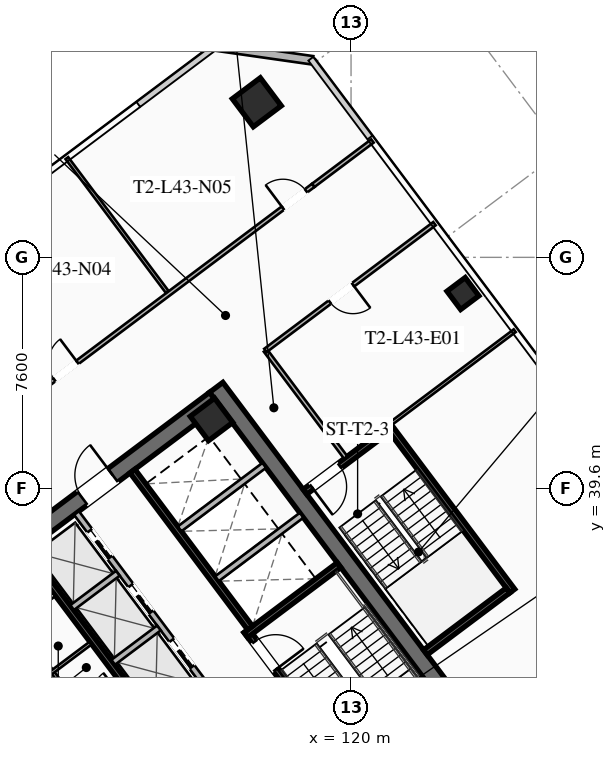
"""IFC4 building model, lengths in metres.
Left out: names, types, materials, properties, quantities, classifications, styles, units other than length and angle.
Written with IfcOpenShell. Run it as: python <this file> out.ifc"""

import sys

from ifc_helpers import new_model, si_unit, direction, frame, frame_2d, origin, origin_2d, place, context, subcontext, project, spatial, rectangle, hollow_rectangle, extrude, element, fill, save


model = new_model("IFC4")
c1 = context("Model", 3, precision=1e-05, world=origin(), true_north=direction((0.0, 1.0)))
c2 = subcontext(c1, "Body", "Model", "MODEL_VIEW")
j1 = project(units=[si_unit("LENGTHUNIT", "METRE"), si_unit("PLANEANGLEUNIT", "RADIAN")], contexts=[c1])
p1 = place(None, origin())
s1 = spatial("IfcSite", under=j1, at=p1, CompositionType="ELEMENT")
p2 = place(p1, origin())
s2 = spatial("IfcBuilding", under=s1, at=p2, CompositionType="ELEMENT")
p3 = place(p2, frame((0.0, 0.0, 160.55)))
s3 = spatial("IfcBuildingStorey", under=s2, at=p3, CompositionType="ELEMENT", Elevation=160.55)
for number, where, z_axis, x_axis in (
    (1, (112.436, 21.077, 0.0), (0.0, 0.0, 1.0), (-0.6, 0.8, 0.0)),
    (2, (115.564, 42.923, 0.0), (0.0, 0.0, 1.0), (0.6, -0.8, 0.0)),
):
    element("IfcWall", number, at=place(p3, frame(where, z_axis=z_axis, x_axis=x_axis)), inside=s3, PredefinedType="SHEAR", context=c2, shape_type="SweptSolid", body=[
        extrude(rectangle(XDim=15.6, YDim=0.55, at=frame_2d((7.8, 0.0))), origin(), (0.0, 0.0, 1.0), 3.55),
    ])
p4 = place(p3, frame((103.461, 33.502, 0.0), z_axis=(0.0, 0.0, 1.0), x_axis=(0.799998054672, 0.600002593761, 0.0)))
e3 = element("IfcWall", 3, at=p4, inside=s3, PredefinedType="SHEAR", context=c2, shape_type="SweptSolid", body=[
    extrude(rectangle(XDim=15.06, YDim=0.55, at=frame_2d((7.53, 0.0))), origin(), (0.0, 0.0, 1.0), 3.55),
])
p5 = place(p4, frame((4.58, 0.0, 0.0)))
e4 = element("IfcOpeningElement", 4, at=p5, cuts=e3, PredefinedType="OPENING", context=c2, shape_type="SweptSolid", body=[
    extrude(rectangle(XDim=1.25, YDim=2.25, at=frame_2d((0.625, 1.125))), frame((0.0, 0.285, 0.0), z_axis=(0.0, -1.0, 0.0), x_axis=(1.0, 0.0, 0.0)), (0.0, 0.0, 1.0), 0.57),
])
p6 = place(p4, frame((9.63, 0.0, 0.0)))
e5 = element("IfcOpeningElement", 5, at=p6, cuts=e3, PredefinedType="OPENING", context=c2, shape_type="SweptSolid", body=[
    extrude(rectangle(XDim=1.25, YDim=2.25, at=frame_2d((0.625, 1.125))), frame((0.0, 0.285, 0.0), z_axis=(0.0, -1.0, 0.0), x_axis=(1.0, 0.0, 0.0)), (0.0, 0.0, 1.0), 0.57),
])
p7 = place(p3, frame((115.41, 41.87, 0.0), z_axis=(0.0, 0.0, 1.0), x_axis=(0.799999996291, 0.600000004945, 0.0)))
e6 = element("IfcColumn", 6, at=p7, inside=s3, PredefinedType="COLUMN", context=c2, shape_type="SweptSolid", body=[
    extrude(hollow_rectangle(XDim=1.0, YDim=1.0, WallThickness=0.04, at=origin_2d()), origin(), (0.0, 0.0, 1.0), 3.37),
])
p8 = place(p3, frame((116.9, 52.3, 0.0), z_axis=(0.0, 0.0, 1.0), x_axis=(0.799999996291, 0.600000004945, 0.0)))
e7 = element("IfcColumn", 7, at=p8, inside=s3, PredefinedType="COLUMN", context=c2, shape_type="SweptSolid", body=[
    extrude(hollow_rectangle(XDim=1.15, YDim=1.15, WallThickness=0.045, at=origin_2d()), origin(), (0.0, 0.0, 1.0), 3.37),
])
p9 = place(p3, frame((123.68, 46.01, 0.0), z_axis=(0.0, 0.0, 1.0), x_axis=(0.799999996291, 0.600000004945, 0.0)))
e8 = element("IfcColumn", 8, at=p9, inside=s3, PredefinedType="COLUMN", context=c2, shape_type="SweptSolid", body=[
    extrude(hollow_rectangle(XDim=0.75, YDim=0.75, WallThickness=0.032, at=origin_2d()), origin(), (0.0, 0.0, 1.0), 3.37),
])
p10 = place(p3, frame((115.52, 54.14, 0.0), z_axis=(0.0, 0.0, 1.0), x_axis=(0.989950994782, -0.141410847992, 0.0)))
e9 = element("IfcWall", 9, at=p10, inside=s3, PredefinedType="SOLIDWALL", context=c2, shape_type="SweptSolid", body=[
    extrude(rectangle(XDim=3.253, YDim=0.28, at=frame_2d((1.626, 0.0))), origin(), (0.0, 0.0, 1.0), 3.37),
])
p11 = place(p3, frame((111.44, 29.08, 0.0), z_axis=(0.0, 0.0, 1.0), x_axis=(-0.59999029481, 0.8000072788, 0.0)))
e10 = element("IfcWall", 10, at=p11, inside=s3, PredefinedType="SHEAR", context=c2, shape_type="SweptSolid", body=[
    extrude(rectangle(XDim=8.05, YDim=0.2, at=frame_2d((4.025, 0.0))), origin(), (0.0, 0.0, 1.0), 3.37),
])
p12 = place(p11, frame((0.45, 0.0, 0.0)))
e11 = element("IfcOpeningElement", 11, at=p12, cuts=e10, PredefinedType="OPENING", context=c2, shape_type="SweptSolid", body=[
    extrude(rectangle(XDim=1.15, YDim=2.2, at=frame_2d((0.575, 1.1))), frame((0.0, 0.11, 0.0), z_axis=(0.0, -1.0, 0.0), x_axis=(1.0, 0.0, 0.0)), (0.0, 0.0, 1.0), 0.22),
])
p13 = place(p3, frame((116.56, 34.92, 0.0), z_axis=(0.0, 0.0, 1.0), x_axis=(0.59999029481, -0.8000072788, 0.0)))
e12 = element("IfcWall", 12, at=p13, inside=s3, PredefinedType="SHEAR", context=c2, shape_type="SweptSolid", body=[
    extrude(rectangle(XDim=8.05, YDim=0.2, at=frame_2d((4.025, 0.0))), origin(), (0.0, 0.0, 1.0), 3.37),
])
p14 = place(p13, frame((0.45, 0.0, 0.0)))
e13 = element("IfcOpeningElement", 13, at=p14, cuts=e12, PredefinedType="OPENING", context=c2, shape_type="SweptSolid", body=[
    extrude(rectangle(XDim=1.15, YDim=2.2, at=frame_2d((0.575, 1.1))), frame((0.0, 0.11, 0.0), z_axis=(0.0, -1.0, 0.0), x_axis=(1.0, 0.0, 0.0)), (0.0, 0.0, 1.0), 0.22),
])
p15 = place(p3, frame((116.54, 34.78, 0.0), z_axis=(0.0, 0.0, 1.0), x_axis=(0.800015298837, 0.599979601008, 0.0)))
e14 = element("IfcWall", 14, at=p15, inside=s3, PredefinedType="SHEAR", context=c2, shape_type="SweptSolid", body=[
    extrude(rectangle(XDim=3.83, YDim=0.2, at=frame_2d((1.915, 0.0))), origin(), (0.0, 0.0, 1.0), 3.37),
])
p16 = place(p3, frame((117.998, 25.936, 0.0), z_axis=(0.0, 0.0, 1.0), x_axis=(-0.600002693989, 0.799997979501, 0.0)))
e15 = element("IfcWall", 15, at=p16, inside=s3, PredefinedType="SHEAR", context=c2, shape_type="SweptSolid", body=[
    extrude(rectangle(XDim=14.5, YDim=0.2, at=frame_2d((7.25, 0.0))), origin(), (0.0, 0.0, 1.0), 3.37),
])
p17 = place(p3, frame((112.81, 40.17, 0.0), z_axis=(0.0, 0.0, 1.0), x_axis=(0.599993943644, -0.800004542231, 0.0)))
e16 = element("IfcWall", 16, at=p17, inside=s3, PredefinedType="SHEAR", context=c2, shape_type="SweptSolid", body=[
    extrude(rectangle(XDim=6.45, YDim=0.2, at=frame_2d((3.225, 0.0))), origin(), (0.0, 0.0, 1.0), 3.37),
])
for number, where, z_axis, x_axis in (
    (17, (115.59, 36.63, 0.0), (0.0, 0.0, 1.0), (0.8, 0.6, 0.0)),
    (18, (114.36, 38.27, 0.0), (0.0, 0.0, 1.0), (0.8, 0.6, 0.0)),
):
    element("IfcWall", number, at=place(p3, frame(where, z_axis=z_axis, x_axis=x_axis)), inside=s3, PredefinedType="SOLIDWALL", context=c2, shape_type="SweptSolid", body=[
        extrude(rectangle(XDim=3.48, YDim=0.2, at=frame_2d((1.74, 0.0))), origin(), (0.0, 0.0, 1.0), 3.37),
    ])
p18 = place(p3, frame((107.71, 34.22, 0.0), z_axis=(0.0, 0.0, 1.0), x_axis=(0.799981399002, 0.60002480053, 0.0)))
e19 = element("IfcWall", 19, at=p18, inside=s3, PredefinedType="PARTITIONING", context=c2, shape_type="SweptSolid", body=[
    extrude(rectangle(XDim=3.15, YDim=0.135, at=frame_2d((1.575, 0.0))), origin(), (0.0, 0.0, 1.0), 2.723),
])
p19 = place(p18, frame((0.25, 0.0, 0.0)))
e20 = element("IfcOpeningElement", 20, at=p19, cuts=e19, PredefinedType="OPENING", context=c2, shape_type="SweptSolid", body=[
    extrude(rectangle(XDim=0.95, YDim=2.05, at=frame_2d((0.475, 1.025))), frame((0.0, 0.077, 0.0), z_axis=(0.0, -1.0, 0.0), x_axis=(1.0, 0.0, 0.0)), (0.0, 0.0, 1.0), 0.155),
])
p20 = place(p18, frame((1.95, 0.0, 0.0)))
e21 = element("IfcOpeningElement", 21, at=p20, cuts=e19, PredefinedType="OPENING", context=c2, shape_type="SweptSolid", body=[
    extrude(rectangle(XDim=0.95, YDim=2.05, at=frame_2d((0.475, 1.025))), frame((0.0, 0.077, 0.0), z_axis=(0.0, -1.0, 0.0), x_axis=(1.0, 0.0, 0.0)), (0.0, 0.0, 1.0), 0.155),
])
p21 = place(p3, frame((111.296, 32.072, 0.0), z_axis=(0.0, 0.0, 1.0), x_axis=(-0.59995887973, 0.800030838552, 0.0)))
e22 = element("IfcWall", 22, at=p21, inside=s3, PredefinedType="PARTITIONING", context=c2, shape_type="SweptSolid", body=[
    extrude(rectangle(XDim=3.8, YDim=0.11, at=frame_2d((1.9, 0.0))), origin(), (0.0, 0.0, 1.0), 2.723),
])
p22 = place(p3, frame((108.91, 32.62, 0.0), z_axis=(0.0, 0.0, 1.0), x_axis=(0.800018601094, 0.59997519774, 0.0)))
e23 = element("IfcWall", 23, at=p22, inside=s3, PredefinedType="PARTITIONING", context=c2, shape_type="SweptSolid", body=[
    extrude(rectangle(XDim=3.15, YDim=0.11, at=frame_2d((1.575, 0.0))), origin(), (0.0, 0.0, 1.0), 2.723),
])
p23 = place(p3, frame((115.11, 33.27, 0.0), z_axis=(0.0, 0.0, 1.0), x_axis=(-0.600011322243, 0.799991508192, 0.0)))
e24 = element("IfcWall", 24, at=p23, inside=s3, PredefinedType="SOLIDWALL", context=c2, shape_type="SweptSolid", body=[
    extrude(rectangle(XDim=6.9, YDim=0.2, at=frame_2d((3.45, 0.0))), origin(), (0.0, 0.0, 1.0), 3.37),
])
p24 = place(p23, frame((0.575, 0.0, 0.0)))
e25 = element("IfcOpeningElement", 25, at=p24, cuts=e24, PredefinedType="OPENING", context=c2, shape_type="SweptSolid", body=[
    extrude(rectangle(XDim=1.1, YDim=2.2, at=frame_2d((0.55, 1.1))), frame((0.0, 0.11, 0.0), z_axis=(0.0, -1.0, 0.0), x_axis=(1.0, 0.0, 0.0)), (0.0, 0.0, 1.0), 0.22),
])
p25 = place(p23, frame((2.825, 0.0, 0.0)))
e26 = element("IfcOpeningElement", 26, at=p25, cuts=e24, PredefinedType="OPENING", context=c2, shape_type="SweptSolid", body=[
    extrude(rectangle(XDim=1.1, YDim=2.2, at=frame_2d((0.55, 1.1))), frame((0.0, 0.11, 0.0), z_axis=(0.0, -1.0, 0.0), x_axis=(1.0, 0.0, 0.0)), (0.0, 0.0, 1.0), 0.22),
])
p26 = place(p23, frame((5.075, 0.0, 0.0)))
e27 = element("IfcOpeningElement", 27, at=p26, cuts=e24, PredefinedType="OPENING", context=c2, shape_type="SweptSolid", body=[
    extrude(rectangle(XDim=1.1, YDim=2.2, at=frame_2d((0.55, 1.1))), frame((0.0, 0.11, 0.0), z_axis=(0.0, -1.0, 0.0), x_axis=(1.0, 0.0, 0.0)), (0.0, 0.0, 1.0), 0.22),
])
p27 = place(p3, frame((112.176, 33.882, 0.0), z_axis=(0.0, 0.0, 1.0), x_axis=(0.8, 0.6, 0.0)))
e28 = element("IfcWall", 28, at=p27, inside=s3, PredefinedType="SOLIDWALL", context=c2, shape_type="SweptSolid", body=[
    extrude(rectangle(XDim=1.88, YDim=0.2, at=frame_2d((0.94, 0.0))), origin(), (0.0, 0.0, 1.0), 3.37),
])
p28 = place(p3, frame((110.826, 35.682, 0.0), z_axis=(0.0, 0.0, 1.0), x_axis=(0.799984418148, 0.600020775241, 0.0)))
e29 = element("IfcWall", 29, at=p28, inside=s3, PredefinedType="SOLIDWALL", context=c2, shape_type="SweptSolid", body=[
    extrude(rectangle(XDim=1.88, YDim=0.2, at=frame_2d((0.94, 0.0))), origin(), (0.0, 0.0, 1.0), 3.37),
])
p29 = place(p3, frame((125.304, 36.228, 0.0), z_axis=(0.0, 0.0, 1.0), x_axis=(-0.59998851072, 0.800008616831, 0.0)))
e30 = element("IfcWall", 30, at=p29, inside=s3, PredefinedType="SHEAR", context=c2, shape_type="SweptSolid", body=[
    extrude(rectangle(XDim=6.8, YDim=0.2, at=frame_2d((3.4, 0.0))), origin(), (0.0, 0.0, 1.0), 3.37),
])
p30 = place(p3, frame((121.204, 41.528, 0.0), z_axis=(0.0, 0.0, 1.0), x_axis=(-0.800017232136, -0.599977023131, 0.0)))
e31 = element("IfcWall", 31, at=p30, inside=s3, PredefinedType="SHEAR", context=c2, shape_type="SweptSolid", body=[
    extrude(rectangle(XDim=3.4, YDim=0.2, at=frame_2d((1.7, 0.0))), origin(), (0.0, 0.0, 1.0), 3.37),
])
p31 = place(p30, frame((1.975, 0.0, 0.0)))
e32 = element("IfcOpeningElement", 32, at=p31, cuts=e31, PredefinedType="OPENING", context=c2, shape_type="SweptSolid", body=[
    extrude(rectangle(XDim=1.15, YDim=2.2, at=frame_2d((0.575, 1.1))), frame((0.0, 0.11, 0.0), z_axis=(0.0, -1.0, 0.0), x_axis=(1.0, 0.0, 0.0)), (0.0, 0.0, 1.0), 0.22),
])
p32 = place(p3, frame((122.444, 34.208, 0.0), z_axis=(0.0, 0.0, 1.0), x_axis=(0.79999138319, 0.600011488909, 0.0)))
e33 = element("IfcWall", 33, at=p32, inside=s3, PredefinedType="SHEAR", context=c2, shape_type="SweptSolid", body=[
    extrude(rectangle(XDim=3.4, YDim=0.2, at=frame_2d((1.7, 0.0))), origin(), (0.0, 0.0, 1.0), 3.37),
])
p33 = place(p3, frame((119.824, 40.618, 0.0), z_axis=(0.0, 0.0, 1.0), x_axis=(-0.599982243973, 0.800013316712, 0.0)))
e34 = element("IfcWall", 34, at=p33, inside=s3, PredefinedType="PARTITIONING", context=c2, shape_type="SweptSolid", body=[
    extrude(rectangle(XDim=4.4, YDim=0.135, at=frame_2d((2.2, 0.0))), origin(), (0.0, 0.0, 1.0), 2.723),
])
p34 = place(p3, frame((95.8, 32.35, 0.0), z_axis=(0.0, 0.0, 1.0), x_axis=(0.8, 0.6, 0.0)))
e35 = element("IfcWall", 35, at=p34, inside=s3, PredefinedType="PARTITIONING", context=c2, shape_type="SweptSolid", body=[
    extrude(rectangle(XDim=28.7, YDim=0.135, at=frame_2d((14.35, 0.0))), origin(), (0.0, 0.0, 1.0), 2.723),
])
p35 = place(p34, frame((0.3, 0.0, 0.0)))
e36 = element("IfcOpeningElement", 36, at=p35, cuts=e35, PredefinedType="OPENING", context=c2, shape_type="SweptSolid", body=[
    extrude(rectangle(XDim=0.95, YDim=2.05, at=frame_2d((0.475, 1.025))), frame((0.0, 0.077, 0.0), z_axis=(0.0, -1.0, 0.0), x_axis=(1.0, 0.0, 0.0)), (0.0, 0.0, 1.0), 0.155),
])
p36 = place(p34, frame((9.959, 0.0, 0.0)))
e37 = element("IfcOpeningElement", 37, at=p36, cuts=e35, PredefinedType="OPENING", context=c2, shape_type="SweptSolid", body=[
    extrude(rectangle(XDim=0.95, YDim=2.05, at=frame_2d((0.475, 1.025))), frame((0.0, 0.077, 0.0), z_axis=(0.0, -1.0, 0.0), x_axis=(1.0, 0.0, 0.0)), (0.0, 0.0, 1.0), 0.155),
])
p37 = place(p34, frame((14.005, 0.0, 0.0)))
e38 = element("IfcOpeningElement", 38, at=p37, cuts=e35, PredefinedType="OPENING", context=c2, shape_type="SweptSolid", body=[
    extrude(rectangle(XDim=0.95, YDim=2.05, at=frame_2d((0.475, 1.025))), frame((0.0, 0.077, 0.0), z_axis=(0.0, -1.0, 0.0), x_axis=(1.0, 0.0, 0.0)), (0.0, 0.0, 1.0), 0.155),
])
p38 = place(p34, frame((18.049, 0.0, 0.0)))
e39 = element("IfcOpeningElement", 39, at=p38, cuts=e35, PredefinedType="OPENING", context=c2, shape_type="SweptSolid", body=[
    extrude(rectangle(XDim=0.95, YDim=2.05, at=frame_2d((0.475, 1.025))), frame((0.0, 0.077, 0.0), z_axis=(0.0, -1.0, 0.0), x_axis=(1.0, 0.0, 0.0)), (0.0, 0.0, 1.0), 0.155),
])
p39 = place(p34, frame((27.45, 0.0, 0.0)))
e40 = element("IfcOpeningElement", 40, at=p39, cuts=e35, PredefinedType="OPENING", context=c2, shape_type="SweptSolid", body=[
    extrude(rectangle(XDim=0.95, YDim=2.05, at=frame_2d((0.475, 1.025))), frame((0.0, 0.077, 0.0), z_axis=(0.0, -1.0, 0.0), x_axis=(1.0, 0.0, 0.0)), (0.0, 0.0, 1.0), 0.155),
])
p40 = place(p3, frame((118.76, 49.57, 0.0), z_axis=(0.0, 0.0, 1.0), x_axis=(0.800012055778, 0.599983925293, 0.0)))
e41 = element("IfcWall", 41, at=p40, inside=s3, PredefinedType="PARTITIONING", context=c2, shape_type="SweptSolid", body=[
    extrude(rectangle(XDim=2.43, YDim=0.135, at=frame_2d((1.215, 0.0))), origin(), (0.0, 0.0, 1.0), 2.723),
])
p41 = place(p3, frame((113.952, 46.064, 0.0), z_axis=(0.0, 0.0, 1.0), x_axis=(-0.599964488045, 0.800026632735, 0.0)))
e42 = element("IfcWall", 42, at=p41, inside=s3, PredefinedType="PARTITIONING", context=c2, shape_type="SweptSolid", body=[
    extrude(rectangle(XDim=5.5, YDim=0.11, at=frame_2d((2.75, 0.0))), origin(), (0.0, 0.0, 1.0), 2.723),
])
p42 = place(p3, frame((122.744, 48.308, 0.0), z_axis=(0.0, 0.0, 1.0), x_axis=(-0.79997892247, -0.600028102345, 0.0)))
e43 = element("IfcWall", 43, at=p42, inside=s3, PredefinedType="PARTITIONING", context=c2, shape_type="SweptSolid", body=[
    extrude(rectangle(XDim=6.95, YDim=0.135, at=frame_2d((3.475, 0.0))), origin(), (0.0, 0.0, 1.0), 2.723),
])
p43 = place(p42, frame((3.35, 0.0, 0.0)))
e44 = element("IfcOpeningElement", 44, at=p43, cuts=e43, PredefinedType="OPENING", context=c2, shape_type="SweptSolid", body=[
    extrude(rectangle(XDim=0.95, YDim=2.05, at=frame_2d((0.475, 1.025))), frame((0.0, 0.077, 0.0), z_axis=(0.0, -1.0, 0.0), x_axis=(1.0, 0.0, 0.0)), (0.0, 0.0, 1.0), 0.155),
])
p44 = place(p3, frame((125.208, 30.656, 0.0), z_axis=(0.0, 0.0, 1.0), x_axis=(0.800006797429, 0.599990936654, 0.0)))
e45 = element("IfcWall", 45, at=p44, inside=s3, PredefinedType="PARTITIONING", context=c2, shape_type="SweptSolid", body=[
    extrude(rectangle(XDim=8.62, YDim=0.135, at=frame_2d((4.31, 0.0))), origin(), (0.0, 0.0, 1.0), 2.723),
])
p45 = place(p44, frame((2.045, 0.0, 0.0)))
e46 = element("IfcOpeningElement", 46, at=p45, cuts=e45, PredefinedType="OPENING", context=c2, shape_type="SweptSolid", body=[
    extrude(rectangle(XDim=0.95, YDim=2.05, at=frame_2d((0.475, 1.025))), frame((0.0, 0.077, 0.0), z_axis=(0.0, -1.0, 0.0), x_axis=(1.0, 0.0, 0.0)), (0.0, 0.0, 1.0), 0.155),
])
p46 = place(p3, frame((125.384, 44.788, 0.0), z_axis=(0.0, 0.0, 1.0), x_axis=(-0.8, -0.6, 0.0)))
e47 = element("IfcWall", 47, at=p46, inside=s3, PredefinedType="PARTITIONING", context=c2, shape_type="SweptSolid", body=[
    extrude(rectangle(XDim=5.1, YDim=0.11, at=frame_2d((2.55, 0.0))), origin(), (0.0, 0.0, 1.0), 2.723),
])
p47 = place(p6, origin())
e48 = element("IfcDoor", 48, at=p47, inside=s3, OperationType="SINGLE_SWING_RIGHT", PredefinedType="DOOR", context=c2, shape_type="SweptSolid", body=[
    extrude(rectangle(XDim=1.25, YDim=2.25, at=frame_2d((0.625, 1.125))), frame((0.0, 0.025, 0.0), z_axis=(0.0, -1.0, 0.0), x_axis=(1.0, 0.0, 0.0)), (0.0, 0.0, 1.0), 0.05),
])
fill(e5, e48)
p48 = place(p14, origin())
e49 = element("IfcDoor", 49, at=p48, inside=s3, OperationType="SINGLE_SWING_RIGHT", PredefinedType="DOOR", context=c2, shape_type="SweptSolid", body=[
    extrude(rectangle(XDim=1.15, YDim=2.2, at=frame_2d((0.575, 1.1))), frame((0.0, 0.025, 0.0), z_axis=(0.0, -1.0, 0.0), x_axis=(1.0, 0.0, 0.0)), (0.0, 0.0, 1.0), 0.05),
])
fill(e13, e49)
p49 = place(p31, origin())
e50 = element("IfcDoor", 50, at=p49, inside=s3, OperationType="SINGLE_SWING_RIGHT", PredefinedType="DOOR", context=c2, shape_type="SweptSolid", body=[
    extrude(rectangle(XDim=1.15, YDim=2.2, at=frame_2d((0.575, 1.1))), frame((0.0, 0.025, 0.0), z_axis=(0.0, -1.0, 0.0), x_axis=(1.0, 0.0, 0.0)), (0.0, 0.0, 1.0), 0.05),
])
fill(e32, e50)
p50 = place(p38, origin())
e51 = element("IfcDoor", 51, at=p50, inside=s3, OperationType="SINGLE_SWING_RIGHT", PredefinedType="DOOR", context=c2, shape_type="SweptSolid", body=[
    extrude(rectangle(XDim=0.95, YDim=2.05, at=frame_2d((0.475, 1.025))), frame((0.0, 0.025, 0.0), z_axis=(0.0, -1.0, 0.0), x_axis=(1.0, 0.0, 0.0)), (0.0, 0.0, 1.0), 0.05),
])
fill(e39, e51)
p51 = place(p39, origin())
e52 = element("IfcDoor", 52, at=p51, inside=s3, OperationType="SINGLE_SWING_LEFT", PredefinedType="DOOR", context=c2, shape_type="SweptSolid", body=[
    extrude(rectangle(XDim=0.95, YDim=2.05, at=frame_2d((0.475, 1.025))), frame((0.0, 0.025, 0.0), z_axis=(0.0, -1.0, 0.0), x_axis=(1.0, 0.0, 0.0)), (0.0, 0.0, 1.0), 0.05),
])
fill(e40, e52)
p52 = place(p43, origin())
e53 = element("IfcDoor", 53, at=p52, inside=s3, OperationType="SINGLE_SWING_LEFT", PredefinedType="DOOR", context=c2, shape_type="SweptSolid", body=[
    extrude(rectangle(XDim=0.95, YDim=2.05, at=frame_2d((0.475, 1.025))), frame((0.0, 0.025, 0.0), z_axis=(0.0, -1.0, 0.0), x_axis=(1.0, 0.0, 0.0)), (0.0, 0.0, 1.0), 0.05),
])
fill(e44, e53)
p53 = place(p24, origin())
e54 = element("IfcDoor", 54, at=p53, inside=s3, OperationType="SLIDING_TO_LEFT", PredefinedType="DOOR", context=c2, shape_type="SweptSolid", body=[
    extrude(rectangle(XDim=1.1, YDim=2.2, at=frame_2d((0.55, 1.1))), frame((0.0, 0.025, 0.0), z_axis=(0.0, -1.0, 0.0), x_axis=(1.0, 0.0, 0.0)), (0.0, 0.0, 1.0), 0.05),
])
fill(e25, e54)
p54 = place(p25, origin())
e55 = element("IfcDoor", 55, at=p54, inside=s3, OperationType="SLIDING_TO_LEFT", PredefinedType="DOOR", context=c2, shape_type="SweptSolid", body=[
    extrude(rectangle(XDim=1.1, YDim=2.2, at=frame_2d((0.55, 1.1))), frame((0.0, 0.025, 0.0), z_axis=(0.0, -1.0, 0.0), x_axis=(1.0, 0.0, 0.0)), (0.0, 0.0, 1.0), 0.05),
])
fill(e26, e55)
p55 = place(p26, origin())
e56 = element("IfcDoor", 56, at=p55, inside=s3, OperationType="SLIDING_TO_LEFT", PredefinedType="DOOR", context=c2, shape_type="SweptSolid", body=[
    extrude(rectangle(XDim=1.1, YDim=2.2, at=frame_2d((0.55, 1.1))), frame((0.0, 0.025, 0.0), z_axis=(0.0, -1.0, 0.0), x_axis=(1.0, 0.0, 0.0)), (0.0, 0.0, 1.0), 0.05),
])
fill(e27, e56)
save(model, sys.argv[1])
